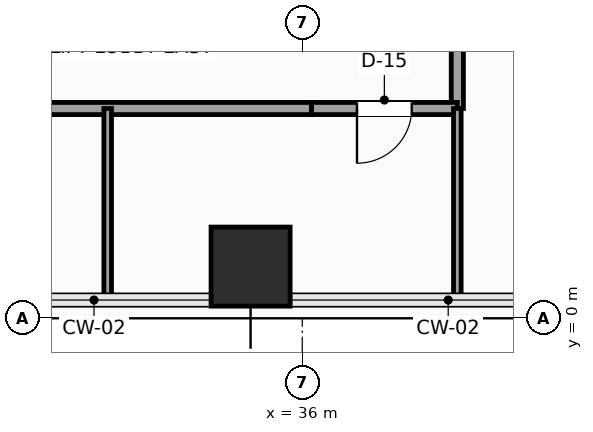
"""IFC4 building model, lengths in metres.
Left out: names, types, materials, properties, quantities, classifications, styles, units other than length and angle.
Written with IfcOpenShell. Run it as: python <this file> out.ifc"""

import sys

from ifc_helpers import new_model, si_unit, direction, frame, frame_2d, origin, origin_2d, place, context, subcontext, project, spatial, rectangle, extrude, element, fill, save


model = new_model("IFC4")
c1 = context("Model", 3, precision=1e-05, world=origin(), true_north=direction((0.0, 1.0)))
c2 = subcontext(c1, "Body", "Model", "MODEL_VIEW")
j1 = project(units=[si_unit("LENGTHUNIT", "METRE"), si_unit("PLANEANGLEUNIT", "RADIAN")], contexts=[c1])
p1 = place(None, origin())
s1 = spatial("IfcSite", under=j1, at=p1, CompositionType="ELEMENT")
p2 = place(p1, origin())
s2 = spatial("IfcBuilding", under=s1, at=p2, CompositionType="ELEMENT")
p3 = place(p2, frame((0.0, 0.0, 51.9)))
s3 = spatial("IfcBuildingStorey", under=s2, at=p3, CompositionType="ELEMENT", Elevation=51.9)
p4 = place(p3, frame((35.15, 0.85, 0.0), z_axis=(0.0, 0.0, 1.0), x_axis=(1.0, 0.0, 0.0)))
e1 = element("IfcColumn", 1, at=p4, inside=s3, PredefinedType="COLUMN", context=c2, shape_type="SweptSolid", body=[
    extrude(rectangle(XDim=1.3, YDim=1.3, at=origin_2d()), origin(), (0.0, 0.0, 1.0), 3.9),
])
p5 = place(p3, frame((38.55, 5.8, 0.0), z_axis=(0.0, 0.0, 1.0), x_axis=(0.0, -1.0, 0.0)))
e2 = element("IfcWall", 2, at=p5, inside=s3, PredefinedType="PARTITIONING", context=c2, shape_type="SweptSolid", body=[
    extrude(rectangle(XDim=2.35, YDim=0.2, at=frame_2d((1.175, 0.0))), origin(), (0.0, 0.0, 1.0), 3.65),
])
p6 = place(p3, frame((38.55, 3.45, 0.0), z_axis=(0.0, 0.0, 1.0), x_axis=(-1.0, 0.0, 0.0)))
e3 = element("IfcWall", 3, at=p6, inside=s3, PredefinedType="PARTITIONING", context=c2, shape_type="SweptSolid", body=[
    extrude(rectangle(XDim=2.4, YDim=0.2, at=frame_2d((1.2, 0.0))), origin(), (0.0, 0.0, 1.0), 3.142),
])
p7 = place(p6, frame((0.75, 0.0, 0.0)))
e4 = element("IfcOpeningElement", 4, at=p7, cuts=e3, PredefinedType="OPENING", context=c2, shape_type="SweptSolid", body=[
    extrude(rectangle(XDim=0.9, YDim=2.1, at=frame_2d((0.45, 1.05))), frame((0.0, 0.11, 0.0), z_axis=(0.0, -1.0, 0.0), x_axis=(1.0, 0.0, 0.0)), (0.0, 0.0, 1.0), 0.22),
])
p8 = place(p3, frame((36.15, 3.45, 0.0), z_axis=(0.0, 0.0, 1.0), x_axis=(-1.0, 0.0, 0.0)))
e5 = element("IfcWall", 5, at=p8, inside=s3, PredefinedType="PARTITIONING", context=c2, shape_type="SweptSolid", body=[
    extrude(rectangle(XDim=14.6, YDim=0.2, at=frame_2d((7.3, 0.0))), origin(), (0.0, 0.0, 1.0), 3.142),
])
p9 = place(p8, frame((11.325, 0.0, 0.0)))
e6 = element("IfcOpeningElement", 6, at=p9, cuts=e5, PredefinedType="OPENING", context=c2, shape_type="SweptSolid", body=[
    extrude(rectangle(XDim=0.9, YDim=2.1, at=frame_2d((0.45, 1.05))), frame((0.0, 0.11, 0.0), z_axis=(0.0, -1.0, 0.0), x_axis=(1.0, 0.0, 0.0)), (0.0, 0.0, 1.0), 0.22),
])
p10 = place(p8, frame((5.7, 0.0, 0.0)))
e7 = element("IfcOpeningElement", 7, at=p10, cuts=e5, PredefinedType="OPENING", context=c2, shape_type="SweptSolid", body=[
    extrude(rectangle(XDim=0.9, YDim=2.1, at=frame_2d((0.45, 1.05))), frame((0.0, 0.11, 0.0), z_axis=(0.0, -1.0, 0.0), x_axis=(1.0, 0.0, 0.0)), (0.0, 0.0, 1.0), 0.22),
])
for number, where, z_axis, x_axis in (
    (8, (32.8, 0.3, 0.0), (0.0, 0.0, 1.0), (0.0, 1.0, 0.0)),
    (9, (38.55, 0.3, 0.0), (0.0, 0.0, 1.0), (0.0, 1.0, 0.0)),
):
    element("IfcWall", number, at=place(p3, frame(where, z_axis=z_axis, x_axis=x_axis)), inside=s3, PredefinedType="PARTITIONING", context=c2, shape_type="SweptSolid", body=[
        extrude(rectangle(XDim=3.15, YDim=0.125, at=frame_2d((1.575, 0.0))), origin(), (0.0, 0.0, 1.0), 3.65),
    ])
p11 = place(p7, origin())
e10 = element("IfcDoor", 10, at=p11, inside=s3, OperationType="SINGLE_SWING_RIGHT", PredefinedType="DOOR", context=c2, shape_type="SweptSolid", body=[
    extrude(rectangle(XDim=0.9, YDim=2.1, at=frame_2d((0.45, 1.05))), frame((0.0, 0.025, 0.0), z_axis=(0.0, -1.0, 0.0), x_axis=(1.0, 0.0, 0.0)), (0.0, 0.0, 1.0), 0.05),
])
fill(e4, e10)
save(model, sys.argv[1])
